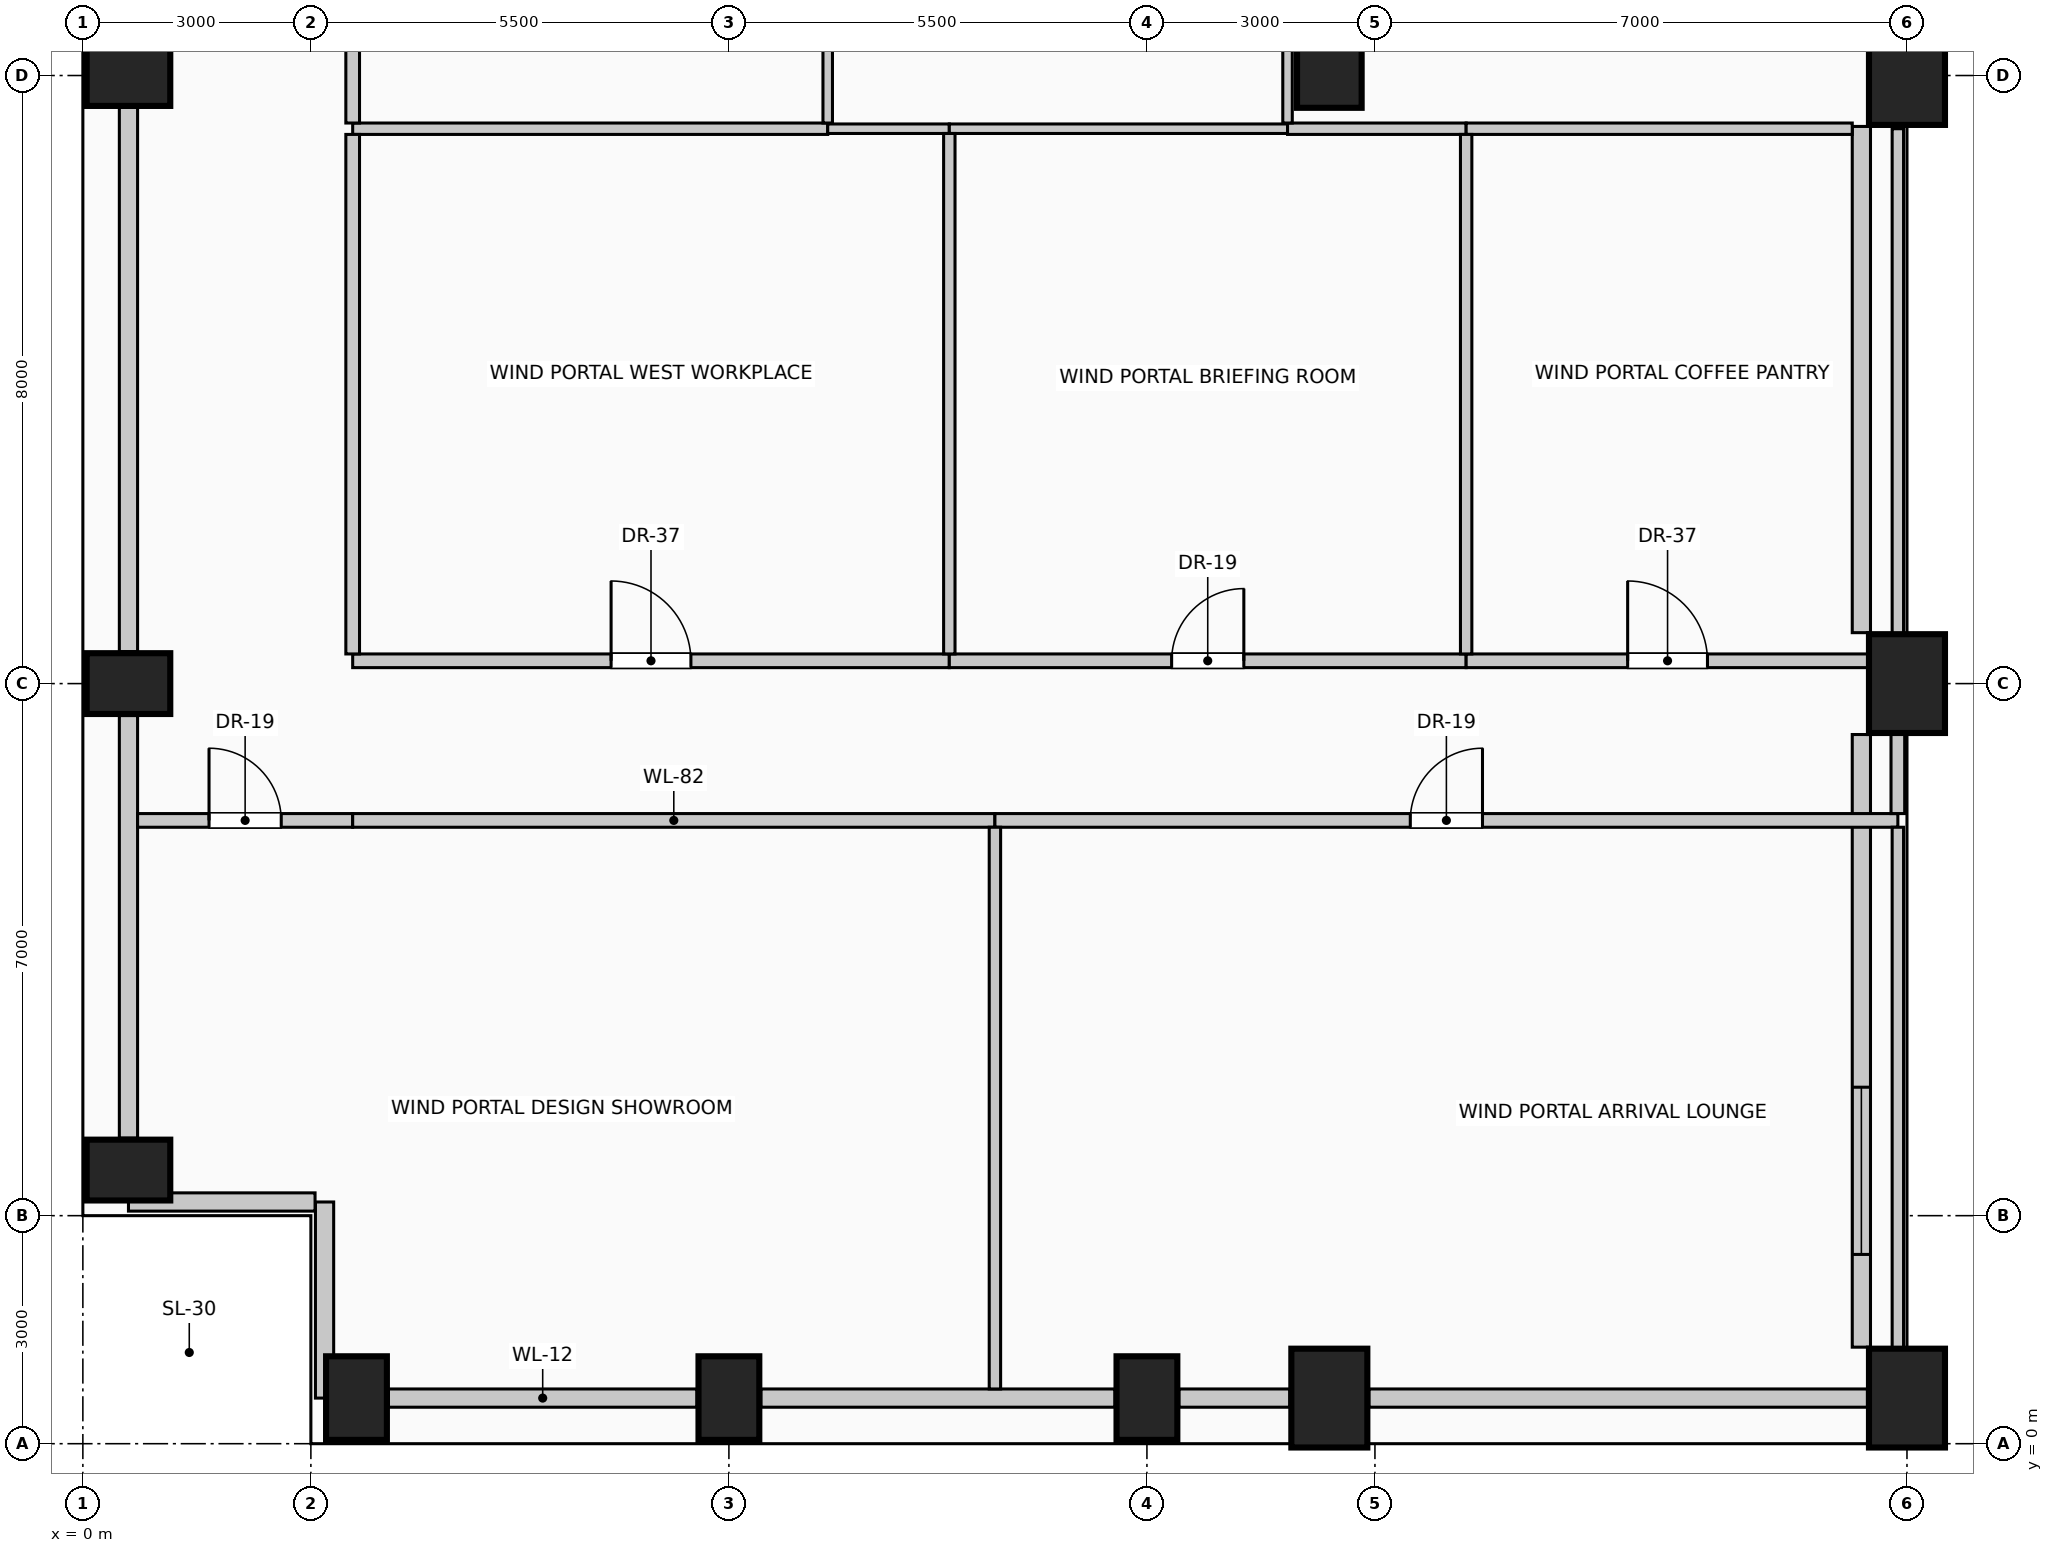
"""IFC4 building model, lengths in metres.
Left out: names, types, materials, properties, quantities, classifications, styles, units other than length and angle.
Written with IfcOpenShell. Run it as: python <this file> out.ifc"""

import sys

from ifc_helpers import new_model, si_unit, direction, frame, frame_2d, origin, origin_2d, place, context, subcontext, project, spatial, rectangle, circle, extrude, element, fill, save


model = new_model("IFC4")
c1 = context("Model", 3, precision=1e-05, world=origin(), true_north=direction((0.0, 1.0)))
c2 = subcontext(c1, "Body", "Model", "MODEL_VIEW")
j1 = project(units=[si_unit("LENGTHUNIT", "METRE"), si_unit("PLANEANGLEUNIT", "RADIAN")], contexts=[c1])
p1 = place(None, origin())
s1 = spatial("IfcSite", under=j1, at=p1, CompositionType="ELEMENT")
p2 = place(p1, origin())
s2 = spatial("IfcBuilding", under=s1, at=p2, CompositionType="ELEMENT")
p3 = place(p2, frame((0.0, 0.0, 194.6)))
s3 = spatial("IfcBuildingStorey", under=s2, at=p3, CompositionType="ELEMENT", Elevation=194.6)
for number, where, z_axis, x_axis in (
    (1, (3.6, 0.6, 0.0), (0.0, 0.0, 1.0), (1.0, 0.0, 0.0)),
    (2, (8.5, 0.6, 0.0), (0.0, 0.0, 1.0), (1.0, 0.0, 0.0)),
    (3, (14.0, 0.6, 0.0), (0.0, 0.0, 1.0), (1.0, 0.0, 0.0)),
):
    element("IfcColumn", number, at=place(p3, frame(where, z_axis=z_axis, x_axis=x_axis)), inside=s3, PredefinedType="COLUMN", context=c2, shape_type="SweptSolid", body=[
        extrude(rectangle(XDim=0.8, YDim=1.1, at=origin_2d()), origin(), (0.0, 0.0, 1.0), 4.0),
    ])
for number, where, z_axis, x_axis in (
    (4, (16.4, 0.6, 0.0), (0.0, 0.0, 1.0), (1.0, 0.0, 0.0)),
    (5, (24.0, 0.6, 0.0), (0.0, 0.0, 1.0), (1.0, 0.0, 0.0)),
):
    element("IfcColumn", number, at=place(p3, frame(where, z_axis=z_axis, x_axis=x_axis)), inside=s3, PredefinedType="COLUMN", context=c2, shape_type="SweptSolid", body=[
        extrude(rectangle(XDim=1.0, YDim=1.3, at=origin_2d()), origin(), (0.0, 0.0, 1.0), 4.0),
    ])
for number, where, z_axis, x_axis in (
    (6, (0.6, 3.6, 0.0), (0.0, 0.0, 1.0), (0.0, 1.0, 0.0)),
    (7, (0.6, 10.0, 0.0), (0.0, 0.0, 1.0), (0.0, 1.0, 0.0)),
    (8, (0.6, 18.0, 0.0), (0.0, 0.0, 1.0), (0.0, 1.0, 0.0)),
):
    element("IfcColumn", number, at=place(p3, frame(where, z_axis=z_axis, x_axis=x_axis)), inside=s3, PredefinedType="COLUMN", context=c2, shape_type="SweptSolid", body=[
        extrude(rectangle(XDim=0.8, YDim=1.1, at=origin_2d()), origin(), (0.0, 0.0, 1.0), 4.0),
    ])
for number, where, z_axis, x_axis in (
    (9, (24.0, 10.0, 0.0), (0.0, 0.0, 1.0), (1.0, 0.0, 0.0)),
    (10, (24.0, 18.0, 0.0), (0.0, 0.0, 1.0), (1.0, 0.0, 0.0)),
):
    element("IfcColumn", number, at=place(p3, frame(where, z_axis=z_axis, x_axis=x_axis)), inside=s3, PredefinedType="COLUMN", context=c2, shape_type="SweptSolid", body=[
        extrude(rectangle(XDim=1.0, YDim=1.3, at=origin_2d()), origin(), (0.0, 0.0, 1.0), 4.0),
    ])
p4 = place(p3, frame((16.4, 18.0, 0.0), z_axis=(0.0, 0.0, 1.0), x_axis=(1.0, 0.0, 0.0)))
e11 = element("IfcColumn", 11, at=p4, inside=s3, PredefinedType="COLUMN", context=c2, shape_type="SweptSolid", body=[
    extrude(circle(Radius=0.425, at=origin_2d()), origin(), (0.0, 0.0, 1.0), 4.0),
])
p5 = place(p3, frame((8.08, 0.6, 0.0), z_axis=(0.0, 0.0, 1.0), x_axis=(-1.0, 0.0, 0.0)))
e12 = element("IfcWall", 12, at=p5, inside=s3, PredefinedType="SOLIDWALL", context=c2, shape_type="SweptSolid", body=[
    extrude(rectangle(XDim=4.06, YDim=0.24, at=frame_2d((2.03, 0.0))), origin(), (0.0, 0.0, 1.0), 3.0),
])
p6 = place(p3, frame((13.58, 0.6, 0.0), z_axis=(0.0, 0.0, 1.0), x_axis=(-1.0, 0.0, 0.0)))
e13 = element("IfcWall", 13, at=p6, inside=s3, PredefinedType="SOLIDWALL", context=c2, shape_type="SweptSolid", body=[
    extrude(rectangle(XDim=4.66, YDim=0.24, at=frame_2d((2.33, 0.0))), origin(), (0.0, 0.0, 1.0), 3.0),
])
p7 = place(p3, frame((15.88, 0.6, 0.0), z_axis=(0.0, 0.0, 1.0), x_axis=(-1.0, 0.0, 0.0)))
e14 = element("IfcWall", 14, at=p7, inside=s3, PredefinedType="SOLIDWALL", context=c2, shape_type="SweptSolid", body=[
    extrude(rectangle(XDim=1.46, YDim=0.24, at=frame_2d((0.73, 0.0))), origin(), (0.0, 0.0, 1.0), 3.0),
])
p8 = place(p3, frame((23.48, 0.6, 0.0), z_axis=(0.0, 0.0, 1.0), x_axis=(-1.0, 0.0, 0.0)))
e15 = element("IfcWall", 15, at=p8, inside=s3, PredefinedType="SOLIDWALL", context=c2, shape_type="SweptSolid", body=[
    extrude(rectangle(XDim=6.56, YDim=0.24, at=frame_2d((3.28, 0.0))), origin(), (0.0, 0.0, 1.0), 3.0),
])
p9 = place(p3, frame((0.6, 4.02, 0.0), z_axis=(0.0, 0.0, 1.0), x_axis=(0.0, 1.0, 0.0)))
e16 = element("IfcWall", 16, at=p9, inside=s3, PredefinedType="SOLIDWALL", context=c2, shape_type="SweptSolid", body=[
    extrude(rectangle(XDim=5.56, YDim=0.24, at=frame_2d((2.78, 0.0))), origin(), (0.0, 0.0, 1.0), 3.0),
])
p10 = place(p3, frame((0.6, 10.42, 0.0), z_axis=(0.0, 0.0, 1.0), x_axis=(0.0, 1.0, 0.0)))
e17 = element("IfcWall", 17, at=p10, inside=s3, PredefinedType="SOLIDWALL", context=c2, shape_type="SweptSolid", body=[
    extrude(rectangle(XDim=7.16, YDim=0.24, at=frame_2d((3.58, 0.0))), origin(), (0.0, 0.0, 1.0), 3.0),
])
p11 = place(p3, frame((3.18, 0.6, 0.0), z_axis=(0.0, 0.0, 1.0), x_axis=(0.0, 1.0, 0.0)))
e18 = element("IfcWall", 18, at=p11, inside=s3, PredefinedType="SOLIDWALL", context=c2, shape_type="SweptSolid", body=[
    extrude(rectangle(XDim=2.58, YDim=0.24, at=frame_2d((1.29, 0.0))), origin(), (0.0, 0.0, 1.0), 3.75),
])
p12 = place(p3, frame((3.055, 3.18, 0.0), z_axis=(0.0, 0.0, 1.0), x_axis=(-1.0, 0.0, 0.0)))
e19 = element("IfcWall", 19, at=p12, inside=s3, PredefinedType="SOLIDWALL", context=c2, shape_type="SweptSolid", body=[
    extrude(rectangle(XDim=2.455, YDim=0.24, at=frame_2d((1.228, 0.0))), origin(), (0.0, 0.0, 1.0), 3.75),
])
p13 = place(p3, frame((23.4, 9.33, 0.0), z_axis=(0.0, 0.0, 1.0), x_axis=(0.0, -1.0, 0.0)))
e20 = element("IfcWall", 20, at=p13, inside=s3, PredefinedType="SOLIDWALL", context=c2, shape_type="SweptSolid", body=[
    extrude(rectangle(XDim=8.06, YDim=0.24, at=frame_2d((4.03, 0.0))), origin(), (0.0, 0.0, 1.0), 3.75),
])
p14 = place(p13, frame((4.64, 0.0, 0.42)))
e21 = element("IfcOpeningElement", 21, at=p14, cuts=e20, PredefinedType="OPENING", context=c2, shape_type="SweptSolid", body=[
    extrude(rectangle(XDim=2.2, YDim=1.95, at=frame_2d((1.1, 0.975))), frame((0.0, 0.13, 0.0), z_axis=(0.0, -1.0, 0.0), x_axis=(1.0, 0.0, 0.0)), (0.0, 0.0, 1.0), 0.26),
])
p15 = place(p3, frame((23.4, 17.33, 0.0), z_axis=(0.0, 0.0, 1.0), x_axis=(0.0, -1.0, 0.0)))
e22 = element("IfcWall", 22, at=p15, inside=s3, PredefinedType="SOLIDWALL", context=c2, shape_type="SweptSolid", body=[
    extrude(rectangle(XDim=6.66, YDim=0.24, at=frame_2d((3.33, 0.0))), origin(), (0.0, 0.0, 1.0), 3.75),
])
p16 = place(p3, frame((0.72, 8.2, 0.0), z_axis=(0.0, 0.0, 1.0), x_axis=(1.0, 0.0, 0.0)))
e23 = element("IfcWall", 23, at=p16, inside=s3, PredefinedType="PARTITIONING", context=c2, shape_type="SweptSolid", body=[
    extrude(rectangle(XDim=2.83, YDim=0.18, at=frame_2d((1.415, 0.0))), origin(), (0.0, 0.0, 1.0), 3.75),
])
p17 = place(p16, frame((0.94, 0.0, 0.0)))
e24 = element("IfcOpeningElement", 24, at=p17, cuts=e23, PredefinedType="OPENING", context=c2, shape_type="SweptSolid", body=[
    extrude(rectangle(XDim=0.95, YDim=2.15, at=frame_2d((0.475, 1.075))), frame((0.0, 0.1, 0.0), z_axis=(0.0, -1.0, 0.0), x_axis=(1.0, 0.0, 0.0)), (0.0, 0.0, 1.0), 0.2),
])
p18 = place(p3, frame((3.55, 8.2, 0.0), z_axis=(0.0, 0.0, 1.0), x_axis=(1.0, 0.0, 0.0)))
e25 = element("IfcWall", 25, at=p18, inside=s3, PredefinedType="PARTITIONING", context=c2, shape_type="SweptSolid", body=[
    extrude(rectangle(XDim=8.45, YDim=0.18, at=frame_2d((4.225, 0.0))), origin(), (0.0, 0.0, 1.0), 3.75),
])
p19 = place(p3, frame((12.0, 8.2, 0.0), z_axis=(0.0, 0.0, 1.0), x_axis=(1.0, 0.0, 0.0)))
e26 = element("IfcWall", 26, at=p19, inside=s3, PredefinedType="PARTITIONING", context=c2, shape_type="SweptSolid", body=[
    extrude(rectangle(XDim=11.88, YDim=0.18, at=frame_2d((5.94, 0.0))), origin(), (0.0, 0.0, 1.0), 3.75),
])
p20 = place(p19, frame((5.465, 0.0, 0.0)))
e27 = element("IfcOpeningElement", 27, at=p20, cuts=e26, PredefinedType="OPENING", context=c2, shape_type="SweptSolid", body=[
    extrude(rectangle(XDim=0.95, YDim=2.15, at=frame_2d((0.475, 1.075))), frame((0.0, 0.1, 0.0), z_axis=(0.0, -1.0, 0.0), x_axis=(1.0, 0.0, 0.0)), (0.0, 0.0, 1.0), 0.2),
])
p21 = place(p3, frame((3.55, 10.3, 0.0), z_axis=(0.0, 0.0, 1.0), x_axis=(1.0, 0.0, 0.0)))
e28 = element("IfcWall", 28, at=p21, inside=s3, PredefinedType="PARTITIONING", context=c2, shape_type="SweptSolid", body=[
    extrude(rectangle(XDim=7.85, YDim=0.18, at=frame_2d((3.925, 0.0))), origin(), (0.0, 0.0, 1.0), 3.75),
])
p22 = place(p21, frame((3.4, 0.0, 0.0)))
e29 = element("IfcOpeningElement", 29, at=p22, cuts=e28, PredefinedType="OPENING", context=c2, shape_type="SweptSolid", body=[
    extrude(rectangle(XDim=1.05, YDim=2.15, at=frame_2d((0.525, 1.075))), frame((0.0, 0.1, 0.0), z_axis=(0.0, -1.0, 0.0), x_axis=(1.0, 0.0, 0.0)), (0.0, 0.0, 1.0), 0.2),
])
p23 = place(p3, frame((11.4, 10.3, 0.0), z_axis=(0.0, 0.0, 1.0), x_axis=(1.0, 0.0, 0.0)))
e30 = element("IfcWall", 30, at=p23, inside=s3, PredefinedType="PARTITIONING", context=c2, shape_type="SweptSolid", body=[
    extrude(rectangle(XDim=6.8, YDim=0.18, at=frame_2d((3.4, 0.0))), origin(), (0.0, 0.0, 1.0), 3.75),
])
p24 = place(p23, frame((2.925, 0.0, 0.0)))
e31 = element("IfcOpeningElement", 31, at=p24, cuts=e30, PredefinedType="OPENING", context=c2, shape_type="SweptSolid", body=[
    extrude(rectangle(XDim=0.95, YDim=2.15, at=frame_2d((0.475, 1.075))), frame((0.0, 0.1, 0.0), z_axis=(0.0, -1.0, 0.0), x_axis=(1.0, 0.0, 0.0)), (0.0, 0.0, 1.0), 0.2),
])
p25 = place(p3, frame((18.2, 10.3, 0.0), z_axis=(0.0, 0.0, 1.0), x_axis=(1.0, 0.0, 0.0)))
e32 = element("IfcWall", 32, at=p25, inside=s3, PredefinedType="PARTITIONING", context=c2, shape_type="SweptSolid", body=[
    extrude(rectangle(XDim=5.3, YDim=0.18, at=frame_2d((2.65, 0.0))), origin(), (0.0, 0.0, 1.0), 3.75),
])
p26 = place(p25, frame((2.125, 0.0, 0.0)))
e33 = element("IfcOpeningElement", 33, at=p26, cuts=e32, PredefinedType="OPENING", context=c2, shape_type="SweptSolid", body=[
    extrude(rectangle(XDim=1.05, YDim=2.15, at=frame_2d((0.525, 1.075))), frame((0.0, 0.1, 0.0), z_axis=(0.0, -1.0, 0.0), x_axis=(1.0, 0.0, 0.0)), (0.0, 0.0, 1.0), 0.2),
])
p27 = place(p3, frame((3.55, 17.3, 0.0), z_axis=(0.0, 0.0, 1.0), x_axis=(1.0, 0.0, 0.0)))
e34 = element("IfcWall", 34, at=p27, inside=s3, PredefinedType="PARTITIONING", context=c2, shape_type="SweptSolid", body=[
    extrude(rectangle(XDim=6.25, YDim=0.15, at=frame_2d((3.125, 0.0))), origin(), (0.0, 0.0, 1.0), 3.75),
])
p28 = place(p3, frame((9.8, 17.3, 0.0), z_axis=(0.0, 0.0, 1.0), x_axis=(1.0, 0.0, 0.0)))
e35 = element("IfcWall", 35, at=p28, inside=s3, PredefinedType="PARTITIONING", context=c2, shape_type="SweptSolid", body=[
    extrude(rectangle(XDim=1.6, YDim=0.125, at=frame_2d((0.8, 0.0))), origin(), (0.0, 0.0, 1.0), 3.75),
])
p29 = place(p3, frame((11.4, 17.3, 0.0), z_axis=(0.0, 0.0, 1.0), x_axis=(1.0, 0.0, 0.0)))
e36 = element("IfcWall", 36, at=p29, inside=s3, PredefinedType="PARTITIONING", context=c2, shape_type="SweptSolid", body=[
    extrude(rectangle(XDim=4.45, YDim=0.125, at=frame_2d((2.225, 0.0))), origin(), (0.0, 0.0, 1.0), 3.75),
])
p30 = place(p3, frame((15.85, 17.3, 0.0), z_axis=(0.0, 0.0, 1.0), x_axis=(1.0, 0.0, 0.0)))
e37 = element("IfcWall", 37, at=p30, inside=s3, PredefinedType="PARTITIONING", context=c2, shape_type="SweptSolid", body=[
    extrude(rectangle(XDim=2.35, YDim=0.15, at=frame_2d((1.175, 0.0))), origin(), (0.0, 0.0, 1.0), 3.75),
])
p31 = place(p3, frame((18.2, 17.3, 0.0), z_axis=(0.0, 0.0, 1.0), x_axis=(1.0, 0.0, 0.0)))
e38 = element("IfcWall", 38, at=p31, inside=s3, PredefinedType="PARTITIONING", context=c2, shape_type="SweptSolid", body=[
    extrude(rectangle(XDim=5.08, YDim=0.15, at=frame_2d((2.54, 0.0))), origin(), (0.0, 0.0, 1.0), 3.75),
])
p32 = place(p3, frame((3.55, 10.39, 0.0), z_axis=(0.0, 0.0, 1.0), x_axis=(0.0, 1.0, 0.0)))
e39 = element("IfcWall", 39, at=p32, inside=s3, PredefinedType="PARTITIONING", context=c2, shape_type="SweptSolid", body=[
    extrude(rectangle(XDim=6.835, YDim=0.18, at=frame_2d((3.417, 0.0))), origin(), (0.0, 0.0, 1.0), 3.75),
])
p33 = place(p3, frame((3.55, 17.375, 0.0), z_axis=(0.0, 0.0, 1.0), x_axis=(0.0, 1.0, 0.0)))
e40 = element("IfcWall", 40, at=p33, inside=s3, PredefinedType="PARTITIONING", context=c2, shape_type="SweptSolid", body=[
    extrude(rectangle(XDim=7.35, YDim=0.18, at=frame_2d((3.675, 0.0))), origin(), (0.0, 0.0, 1.0), 3.75),
])
p34 = place(p3, frame((9.8, 17.375, 0.0), z_axis=(0.0, 0.0, 1.0), x_axis=(0.0, 1.0, 0.0)))
e41 = element("IfcWall", 41, at=p34, inside=s3, PredefinedType="PARTITIONING", context=c2, shape_type="SweptSolid", body=[
    extrude(rectangle(XDim=7.35, YDim=0.125, at=frame_2d((3.675, 0.0))), origin(), (0.0, 0.0, 1.0), 3.75),
])
p35 = place(p3, frame((11.4, 10.39, 0.0), z_axis=(0.0, 0.0, 1.0), x_axis=(0.0, 1.0, 0.0)))
e42 = element("IfcWall", 42, at=p35, inside=s3, PredefinedType="PARTITIONING", context=c2, shape_type="SweptSolid", body=[
    extrude(rectangle(XDim=6.848, YDim=0.15, at=frame_2d((3.424, 0.0))), origin(), (0.0, 0.0, 1.0), 3.75),
])
p36 = place(p3, frame((12.0, 0.72, 0.0), z_axis=(0.0, 0.0, 1.0), x_axis=(0.0, 1.0, 0.0)))
e43 = element("IfcWall", 43, at=p36, inside=s3, PredefinedType="PARTITIONING", context=c2, shape_type="SweptSolid", body=[
    extrude(rectangle(XDim=7.39, YDim=0.15, at=frame_2d((3.695, 0.0))), origin(), (0.0, 0.0, 1.0), 3.75),
])
p37 = place(p3, frame((15.85, 17.375, 0.0), z_axis=(0.0, 0.0, 1.0), x_axis=(0.0, 1.0, 0.0)))
e44 = element("IfcWall", 44, at=p37, inside=s3, PredefinedType="PARTITIONING", context=c2, shape_type="SweptSolid", body=[
    extrude(rectangle(XDim=7.35, YDim=0.125, at=frame_2d((3.675, 0.0))), origin(), (0.0, 0.0, 1.0), 3.75),
])
p38 = place(p3, frame((18.2, 10.39, 0.0), z_axis=(0.0, 0.0, 1.0), x_axis=(0.0, 1.0, 0.0)))
e45 = element("IfcWall", 45, at=p38, inside=s3, PredefinedType="PARTITIONING", context=c2, shape_type="SweptSolid", body=[
    extrude(rectangle(XDim=6.835, YDim=0.15, at=frame_2d((3.417, 0.0))), origin(), (0.0, 0.0, 1.0), 3.75),
])
p39 = place(p3, frame((23.88, 1.25, 0.0), z_axis=(0.0, 0.0, 1.0), x_axis=(0.0, 1.0, 0.0)))
e46 = element("IfcWall", 46, at=p39, inside=s3, PredefinedType="PARTITIONING", context=c2, shape_type="SweptSolid", body=[
    extrude(rectangle(XDim=6.86, YDim=0.15, at=frame_2d((3.43, 0.0))), origin(), (0.0, 0.0, 1.0), 3.145),
])
p40 = place(p3, frame((23.88, 8.29, 0.0), z_axis=(0.0, 0.0, 1.0), x_axis=(0.0, 1.0, 0.0)))
e47 = element("IfcWall", 47, at=p40, inside=s3, PredefinedType="PARTITIONING", context=c2, shape_type="SweptSolid", body=[
    extrude(rectangle(XDim=1.06, YDim=0.18, at=frame_2d((0.53, 0.0))), origin(), (0.0, 0.0, 1.0), 3.145),
])
p41 = place(p3, frame((23.88, 10.65, 0.0), z_axis=(0.0, 0.0, 1.0), x_axis=(0.0, 1.0, 0.0)))
e48 = element("IfcWall", 48, at=p41, inside=s3, PredefinedType="PARTITIONING", context=c2, shape_type="SweptSolid", body=[
    extrude(rectangle(XDim=6.65, YDim=0.15, at=frame_2d((3.325, 0.0))), origin(), (0.0, 0.0, 1.0), 3.145),
])
p42 = place(p14, origin())
e49 = element("IfcWindow", 49, at=p42, inside=s3, PartitioningType="SINGLE_PANEL", PredefinedType="WINDOW", context=c2, shape_type="SweptSolid", body=[
    extrude(rectangle(XDim=2.2, YDim=1.95, at=frame_2d((1.1, 0.975))), frame((0.0, 0.03, 0.0), z_axis=(0.0, -1.0, 0.0), x_axis=(1.0, 0.0, 0.0)), (0.0, 0.0, 1.0), 0.06),
])
fill(e21, e49)
p43 = place(p17, origin())
e50 = element("IfcDoor", 50, at=p43, inside=s3, OperationType="SINGLE_SWING_LEFT", PredefinedType="DOOR", context=c2, shape_type="SweptSolid", body=[
    extrude(rectangle(XDim=0.95, YDim=2.15, at=frame_2d((0.475, 1.075))), frame((0.0, 0.025, 0.0), z_axis=(0.0, -1.0, 0.0), x_axis=(1.0, 0.0, 0.0)), (0.0, 0.0, 1.0), 0.05),
])
fill(e24, e50)
p44 = place(p20, origin())
e51 = element("IfcDoor", 51, at=p44, inside=s3, OperationType="SINGLE_SWING_RIGHT", PredefinedType="DOOR", context=c2, shape_type="SweptSolid", body=[
    extrude(rectangle(XDim=0.95, YDim=2.15, at=frame_2d((0.475, 1.075))), frame((0.0, 0.025, 0.0), z_axis=(0.0, -1.0, 0.0), x_axis=(1.0, 0.0, 0.0)), (0.0, 0.0, 1.0), 0.05),
])
fill(e27, e51)
p45 = place(p22, origin())
e52 = element("IfcDoor", 52, at=p45, inside=s3, OperationType="SINGLE_SWING_LEFT", PredefinedType="DOOR", context=c2, shape_type="SweptSolid", body=[
    extrude(rectangle(XDim=1.05, YDim=2.15, at=frame_2d((0.525, 1.075))), frame((0.0, 0.025, 0.0), z_axis=(0.0, -1.0, 0.0), x_axis=(1.0, 0.0, 0.0)), (0.0, 0.0, 1.0), 0.05),
])
fill(e29, e52)
p46 = place(p24, origin())
e53 = element("IfcDoor", 53, at=p46, inside=s3, OperationType="SINGLE_SWING_RIGHT", PredefinedType="DOOR", context=c2, shape_type="SweptSolid", body=[
    extrude(rectangle(XDim=0.95, YDim=2.15, at=frame_2d((0.475, 1.075))), frame((0.0, 0.025, 0.0), z_axis=(0.0, -1.0, 0.0), x_axis=(1.0, 0.0, 0.0)), (0.0, 0.0, 1.0), 0.05),
])
fill(e31, e53)
p47 = place(p26, origin())
e54 = element("IfcDoor", 54, at=p47, inside=s3, OperationType="SINGLE_SWING_LEFT", PredefinedType="DOOR", context=c2, shape_type="SweptSolid", body=[
    extrude(rectangle(XDim=1.05, YDim=2.15, at=frame_2d((0.525, 1.075))), frame((0.0, 0.025, 0.0), z_axis=(0.0, -1.0, 0.0), x_axis=(1.0, 0.0, 0.0)), (0.0, 0.0, 1.0), 0.05),
])
fill(e33, e54)
save(model, sys.argv[1])
